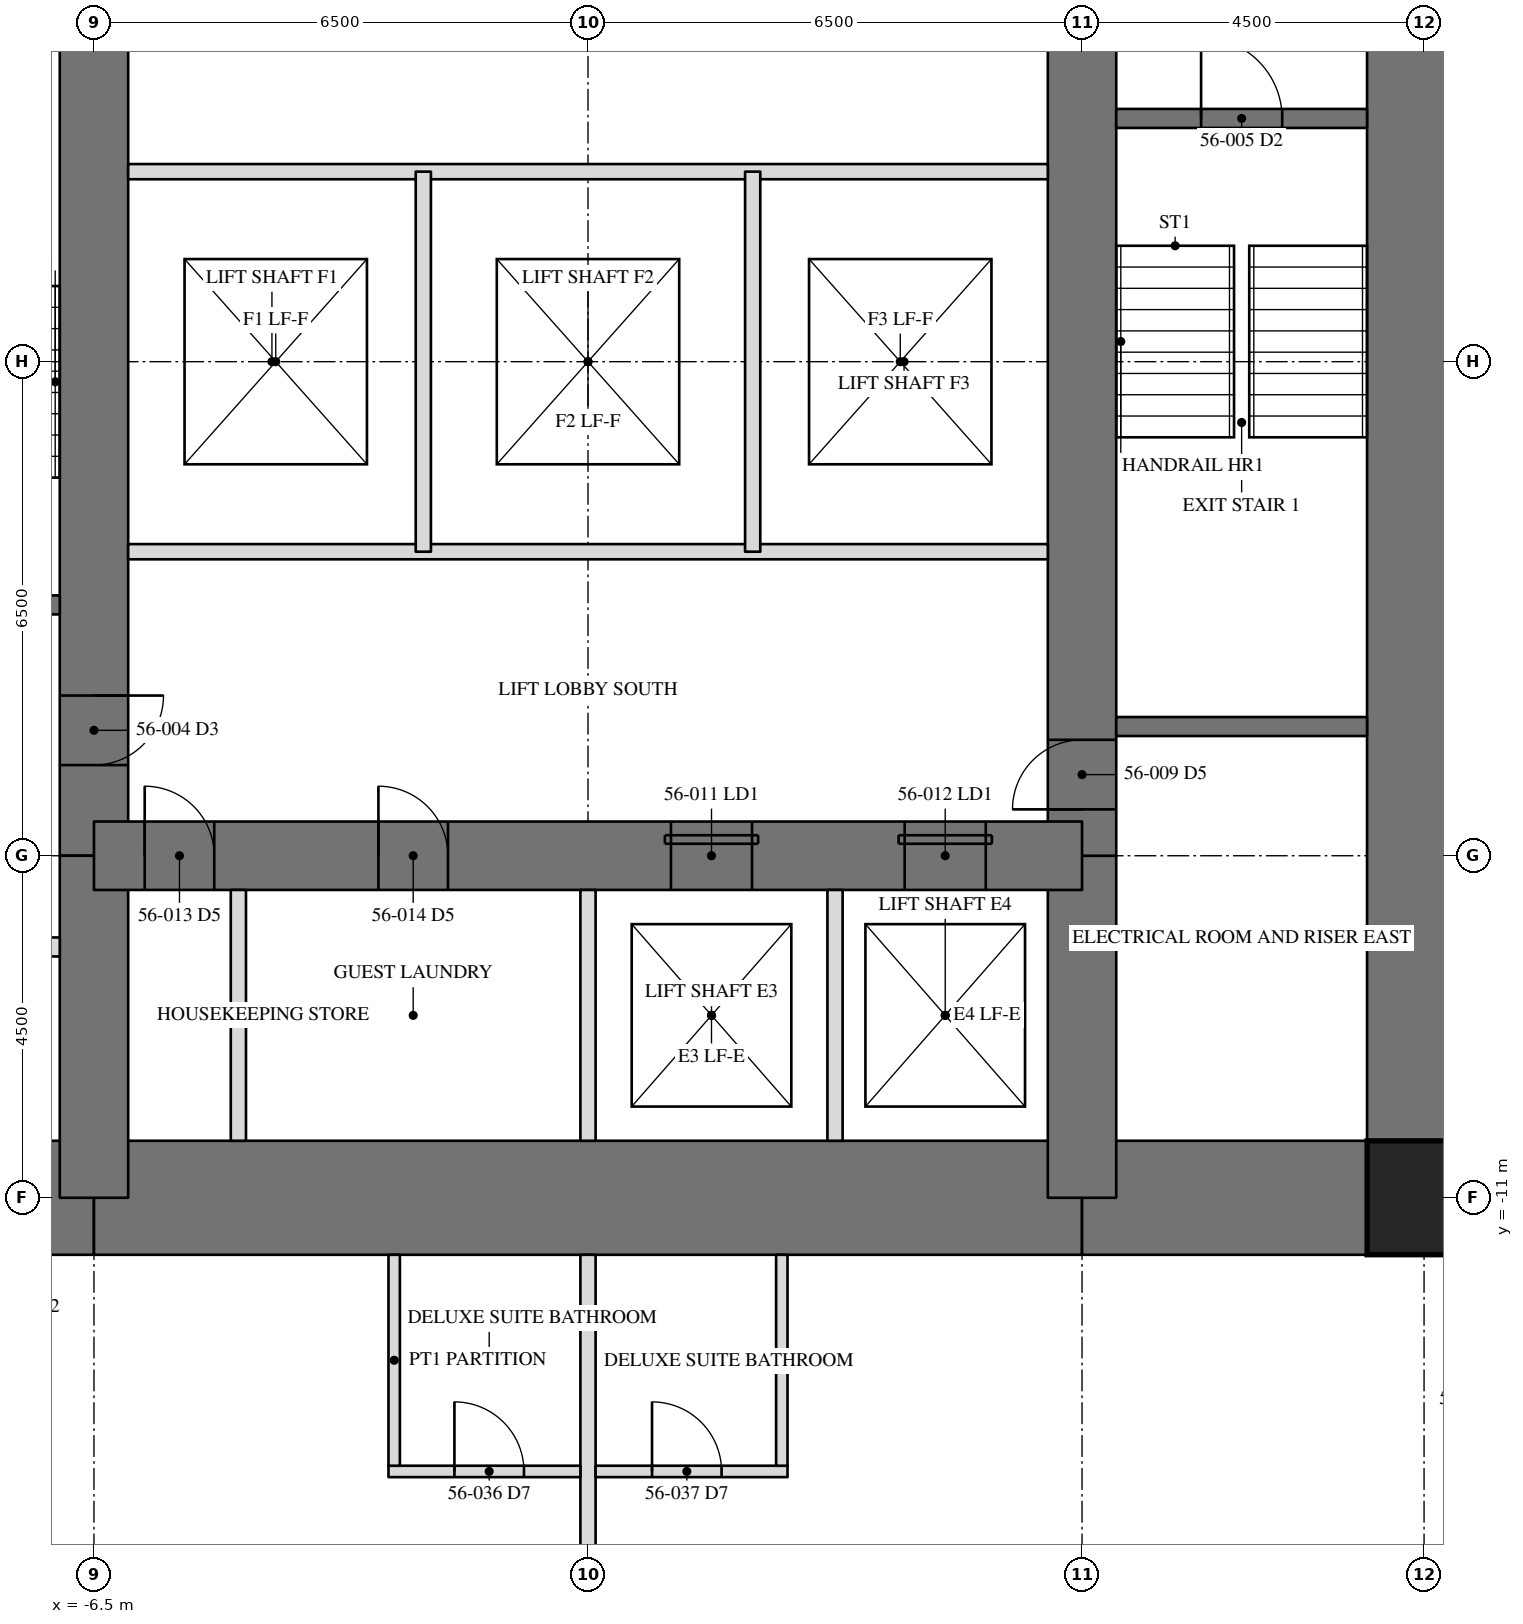
"""IFC4 building model, lengths in metres.
Left out: names, types, materials, properties, quantities, classifications, styles, units other than length and angle.
Written with IfcOpenShell. Run it as: python <this file> out.ifc"""

import sys

from ifc_helpers import new_model, si_unit, direction, frame, frame_2d, origin, origin_2d, place, context, subcontext, project, spatial, rectangle, hollow_rectangle, extrude, element, fill, save


model = new_model("IFC4")
c1 = context("Model", 3, precision=1e-05, world=origin(), true_north=direction((0.0, 1.0)))
c2 = subcontext(c1, "Body", "Model", "MODEL_VIEW")
j1 = project(units=[si_unit("LENGTHUNIT", "METRE"), si_unit("PLANEANGLEUNIT", "RADIAN")], contexts=[c1])
p1 = place(None, origin())
s1 = spatial("IfcSite", under=j1, at=p1, CompositionType="ELEMENT")
p2 = place(p1, origin())
s2 = spatial("IfcBuilding", under=s1, at=p2, CompositionType="ELEMENT")
p3 = place(p2, frame((0.0, 0.0, 232.7)))
s3 = spatial("IfcBuildingStorey", under=s2, at=p3, CompositionType="ELEMENT", Elevation=232.7)
p4 = place(p3, frame((11.0, -11.0, 0.0), z_axis=(0.0, 0.0, 1.0), x_axis=(0.0, 1.0, 0.0)))
e1 = element("IfcWall", 1, at=p4, inside=s3, PredefinedType="SHEAR", context=c2, shape_type="SweptSolid", body=[
    extrude(rectangle(XDim=22.0, YDim=1.5, at=frame_2d((11.0, 0.0))), origin(), (0.0, 0.0, 1.0), 3.5),
])
p5 = place(p4, frame((15.393, 0.0, 0.0)))
e2 = element("IfcOpeningElement", 2, at=p5, cuts=e1, PredefinedType="OPENING", context=c2, shape_type="SweptSolid", body=[
    extrude(rectangle(XDim=0.915, YDim=2.134, at=frame_2d((0.458, 1.067))), frame((0.0, 0.76, 0.0), z_axis=(0.0, -1.0, 0.0), x_axis=(1.0, 0.0, 0.0)), (0.0, 0.0, 1.0), 1.52),
])
p6 = place(p3, frame((-11.0, -11.0, 0.0), z_axis=(0.0, 0.0, 1.0), x_axis=(1.0, 0.0, 0.0)))
e3 = element("IfcWall", 3, at=p6, inside=s3, PredefinedType="SHEAR", context=c2, shape_type="SweptSolid", body=[
    extrude(rectangle(XDim=4.5, YDim=1.5, at=frame_2d((2.25, 0.0))), origin(), (0.0, 0.0, 1.0), 3.5),
])
p7 = place(p3, frame((-6.5, -11.0, 0.0), z_axis=(0.0, 0.0, 1.0), x_axis=(1.0, 0.0, 0.0)))
e4 = element("IfcWall", 4, at=p7, inside=s3, PredefinedType="SHEAR", context=c2, shape_type="SweptSolid", body=[
    extrude(rectangle(XDim=13.0, YDim=1.5, at=frame_2d((6.5, 0.0))), origin(), (0.0, 0.0, 1.0), 3.5),
])
p8 = place(p3, frame((6.5, -11.0, 0.0), z_axis=(0.0, 0.0, 1.0), x_axis=(1.0, 0.0, 0.0)))
e5 = element("IfcWall", 5, at=p8, inside=s3, PredefinedType="SHEAR", context=c2, shape_type="SweptSolid", body=[
    extrude(rectangle(XDim=4.5, YDim=1.5, at=frame_2d((2.25, 0.0))), origin(), (0.0, 0.0, 1.0), 3.5),
])
p9 = place(p3, frame((6.5, -11.0, 0.0), z_axis=(0.0, 0.0, 1.0), x_axis=(0.0, 1.0, 0.0)))
e6 = element("IfcWall", 6, at=p9, inside=s3, PredefinedType="SHEAR", context=c2, shape_type="SweptSolid", body=[
    extrude(rectangle(XDim=4.5, YDim=0.9, at=frame_2d((2.25, 0.0))), origin(), (0.0, 0.0, 1.0), 3.5),
])
p10 = place(p3, frame((6.5, -6.5, 0.0), z_axis=(0.0, 0.0, 1.0), x_axis=(0.0, 1.0, 0.0)))
e7 = element("IfcWall", 7, at=p10, inside=s3, PredefinedType="SHEAR", context=c2, shape_type="SweptSolid", body=[
    extrude(rectangle(XDim=13.0, YDim=0.9, at=frame_2d((6.5, 0.0))), origin(), (0.0, 0.0, 1.0), 3.5),
])
p11 = place(p10, frame((10.893, 0.0, 0.0)))
e8 = element("IfcOpeningElement", 8, at=p11, cuts=e7, PredefinedType="OPENING", context=c2, shape_type="SweptSolid", body=[
    extrude(rectangle(XDim=0.915, YDim=2.134, at=frame_2d((0.458, 1.067))), frame((0.0, 0.46, 0.0), z_axis=(0.0, -1.0, 0.0), x_axis=(1.0, 0.0, 0.0)), (0.0, 0.0, 1.0), 0.92),
])
p12 = place(p10, frame((0.61, 0.0, 0.0)))
e9 = element("IfcOpeningElement", 9, at=p12, cuts=e7, PredefinedType="OPENING", context=c2, shape_type="SweptSolid", body=[
    extrude(rectangle(XDim=0.915, YDim=2.134, at=frame_2d((0.458, 1.067))), frame((0.0, 0.46, 0.0), z_axis=(0.0, -1.0, 0.0), x_axis=(1.0, 0.0, 0.0)), (0.0, 0.0, 1.0), 0.92),
])
p13 = place(p3, frame((-6.5, 6.5, 0.0), z_axis=(0.0, 0.0, 1.0), x_axis=(0.0, -1.0, 0.0)))
e10 = element("IfcWall", 10, at=p13, inside=s3, PredefinedType="SHEAR", context=c2, shape_type="SweptSolid", body=[
    extrude(rectangle(XDim=13.0, YDim=0.9, at=frame_2d((6.5, 0.0))), origin(), (0.0, 0.0, 1.0), 3.5),
])
p14 = place(p13, frame((10.893, 0.0, 0.0)))
e11 = element("IfcOpeningElement", 11, at=p14, cuts=e10, PredefinedType="OPENING", context=c2, shape_type="SweptSolid", body=[
    extrude(rectangle(XDim=0.915, YDim=2.134, at=frame_2d((0.458, 1.067))), frame((0.0, 0.46, 0.0), z_axis=(0.0, -1.0, 0.0), x_axis=(1.0, 0.0, 0.0)), (0.0, 0.0, 1.0), 0.92),
])
p15 = place(p13, frame((0.61, 0.0, 0.0)))
e12 = element("IfcOpeningElement", 12, at=p15, cuts=e10, PredefinedType="OPENING", context=c2, shape_type="SweptSolid", body=[
    extrude(rectangle(XDim=0.915, YDim=2.134, at=frame_2d((0.458, 1.067))), frame((0.0, 0.46, 0.0), z_axis=(0.0, -1.0, 0.0), x_axis=(1.0, 0.0, 0.0)), (0.0, 0.0, 1.0), 0.92),
])
p16 = place(p3, frame((-6.5, -6.5, 0.0), z_axis=(0.0, 0.0, 1.0), x_axis=(0.0, -1.0, 0.0)))
e13 = element("IfcWall", 13, at=p16, inside=s3, PredefinedType="SHEAR", context=c2, shape_type="SweptSolid", body=[
    extrude(rectangle(XDim=4.5, YDim=0.9, at=frame_2d((2.25, 0.0))), origin(), (0.0, 0.0, 1.0), 3.5),
])
p17 = place(p3, frame((-6.5, -6.5, 0.0), z_axis=(0.0, 0.0, 1.0), x_axis=(1.0, 0.0, 0.0)))
e14 = element("IfcWall", 14, at=p17, inside=s3, PredefinedType="SHEAR", context=c2, shape_type="SweptSolid", body=[
    extrude(rectangle(XDim=13.0, YDim=0.9, at=frame_2d((6.5, 0.0))), origin(), (0.0, 0.0, 1.0), 3.5),
])
p18 = place(p17, frame((7.592, 0.0, 0.0)))
e15 = element("IfcOpeningElement", 15, at=p18, cuts=e14, PredefinedType="OPENING", context=c2, shape_type="SweptSolid", body=[
    extrude(rectangle(XDim=1.067, YDim=2.134, at=frame_2d((0.533, 1.067))), frame((0.0, 0.46, 0.0), z_axis=(0.0, -1.0, 0.0), x_axis=(1.0, 0.0, 0.0)), (0.0, 0.0, 1.0), 0.92),
])
p19 = place(p17, frame((10.667, 0.0, 0.0)))
e16 = element("IfcOpeningElement", 16, at=p19, cuts=e14, PredefinedType="OPENING", context=c2, shape_type="SweptSolid", body=[
    extrude(rectangle(XDim=1.067, YDim=2.134, at=frame_2d((0.533, 1.067))), frame((0.0, 0.46, 0.0), z_axis=(0.0, -1.0, 0.0), x_axis=(1.0, 0.0, 0.0)), (0.0, 0.0, 1.0), 0.92),
])
p20 = place(p17, frame((0.667, 0.0, 0.0)))
e17 = element("IfcOpeningElement", 17, at=p20, cuts=e14, PredefinedType="OPENING", context=c2, shape_type="SweptSolid", body=[
    extrude(rectangle(XDim=0.915, YDim=2.134, at=frame_2d((0.458, 1.067))), frame((0.0, 0.46, 0.0), z_axis=(0.0, -1.0, 0.0), x_axis=(1.0, 0.0, 0.0)), (0.0, 0.0, 1.0), 0.92),
])
p21 = place(p17, frame((3.742, 0.0, 0.0)))
e18 = element("IfcOpeningElement", 18, at=p21, cuts=e14, PredefinedType="OPENING", context=c2, shape_type="SweptSolid", body=[
    extrude(rectangle(XDim=0.915, YDim=2.134, at=frame_2d((0.458, 1.067))), frame((0.0, 0.46, 0.0), z_axis=(0.0, -1.0, 0.0), x_axis=(1.0, 0.0, 0.0)), (0.0, 0.0, 1.0), 0.92),
])
p22 = place(p3, frame((11.0, -11.0, 0.0), z_axis=(0.0, 0.0, 1.0), x_axis=(1.0, 0.0, 0.0)))
e19 = element("IfcColumn", 19, at=p22, inside=s3, PredefinedType="COLUMN", context=c2, shape_type="SweptSolid", body=[
    extrude(hollow_rectangle(XDim=1.499, YDim=1.499, WallThickness=0.102, at=origin_2d()), origin(), (0.0, 0.0, 1.0), 3.5),
])
p23 = place(p3, frame((6.95, -4.8, 0.0), z_axis=(0.0, 0.0, 1.0), x_axis=(1.0, 0.0, 0.0)))
e20 = element("IfcWall", 20, at=p23, inside=s3, PredefinedType="SOLIDWALL", context=c2, shape_type="SweptSolid", body=[
    extrude(rectangle(XDim=3.3, YDim=0.25, at=frame_2d((1.65, 0.0))), origin(), (0.0, 0.0, 1.0), 3.31),
])
p24 = place(p3, frame((6.95, 3.2, 0.0), z_axis=(0.0, 0.0, 1.0), x_axis=(1.0, 0.0, 0.0)))
e21 = element("IfcWall", 21, at=p24, inside=s3, PredefinedType="SOLIDWALL", context=c2, shape_type="SweptSolid", body=[
    extrude(rectangle(XDim=3.3, YDim=0.25, at=frame_2d((1.65, 0.0))), origin(), (0.0, 0.0, 1.0), 3.31),
])
p25 = place(p24, frame((1.116, 0.0, 0.0)))
e22 = element("IfcOpeningElement", 22, at=p25, cuts=e21, PredefinedType="OPENING", context=c2, shape_type="SweptSolid", body=[
    extrude(rectangle(XDim=1.067, YDim=2.134, at=frame_2d((0.533, 1.067))), frame((0.0, 0.135, 0.0), z_axis=(0.0, -1.0, 0.0), x_axis=(1.0, 0.0, 0.0)), (0.0, 0.0, 1.0), 0.27),
])
p26 = place(p3, frame((-6.95, -3.2, 0.0), z_axis=(0.0, 0.0, 1.0), x_axis=(-1.0, 0.0, 0.0)))
e23 = element("IfcWall", 23, at=p26, inside=s3, PredefinedType="SOLIDWALL", context=c2, shape_type="SweptSolid", body=[
    extrude(rectangle(XDim=3.3, YDim=0.25, at=frame_2d((1.65, 0.0))), origin(), (0.0, 0.0, 1.0), 3.31),
])
p27 = place(p26, frame((1.116, 0.0, 0.0)))
e24 = element("IfcOpeningElement", 24, at=p27, cuts=e23, PredefinedType="OPENING", context=c2, shape_type="SweptSolid", body=[
    extrude(rectangle(XDim=1.067, YDim=2.134, at=frame_2d((0.533, 1.067))), frame((0.0, 0.135, 0.0), z_axis=(0.0, -1.0, 0.0), x_axis=(1.0, 0.0, 0.0)), (0.0, 0.0, 1.0), 0.27),
])
p28 = place(p3, frame((-6.95, -7.7, 0.0), z_axis=(0.0, 0.0, 1.0), x_axis=(-1.0, 0.0, 0.0)))
e25 = element("IfcWall", 25, at=p28, inside=s3, PredefinedType="PARTITIONING", context=c2, shape_type="SweptSolid", body=[
    extrude(rectangle(XDim=3.3, YDim=0.25, at=frame_2d((1.65, 0.0))), origin(), (0.0, 0.0, 1.0), 3.31),
])
p29 = place(p28, frame((0.45, 0.0, 0.0)))
e26 = element("IfcOpeningElement", 26, at=p29, cuts=e25, PredefinedType="OPENING", context=c2, shape_type="SweptSolid", body=[
    extrude(rectangle(XDim=1.219, YDim=2.134, at=frame_2d((0.609, 1.067))), frame((0.0, 0.135, 0.0), z_axis=(0.0, -1.0, 0.0), x_axis=(1.0, 0.0, 0.0)), (0.0, 0.0, 1.0), 0.27),
])
for number, where, z_axis, x_axis in (
    (27, (-6.05, 2.5, 0.0), (0.0, 0.0, 1.0), (1.0, 0.0, 0.0)),
    (28, (6.05, -2.5, 0.0), (0.0, 0.0, 1.0), (-1.0, 0.0, 0.0)),
):
    element("IfcWall", number, at=place(p3, frame(where, z_axis=z_axis, x_axis=x_axis)), inside=s3, PredefinedType="PARTITIONING", context=c2, shape_type="SweptSolid", body=[
        extrude(rectangle(XDim=12.1, YDim=0.2, at=frame_2d((6.05, 0.0))), origin(), (0.0, 0.0, 1.0), 3.31),
    ])
for number, where, z_axis, x_axis in (
    (29, (0.0, -10.25, 0.0), (0.0, 0.0, 1.0), (0.0, 1.0, 0.0)),
    (30, (3.25, -10.25, 0.0), (0.0, 0.0, 1.0), (0.0, 1.0, 0.0)),
):
    element("IfcWall", number, at=place(p3, frame(where, z_axis=z_axis, x_axis=x_axis)), inside=s3, PredefinedType="PARTITIONING", context=c2, shape_type="SweptSolid", body=[
        extrude(rectangle(XDim=3.3, YDim=0.2, at=frame_2d((1.65, 0.0))), origin(), (0.0, 0.0, 1.0), 3.31),
    ])
for number, where, z_axis, x_axis in (
    (31, (-2.167, -2.5, 0.0), (0.0, 0.0, 1.0), (0.0, 1.0, 0.0)),
    (32, (2.167, -2.5, 0.0), (0.0, 0.0, 1.0), (0.0, 1.0, 0.0)),
):
    element("IfcWall", number, at=place(p3, frame(where, z_axis=z_axis, x_axis=x_axis)), inside=s3, PredefinedType="PARTITIONING", context=c2, shape_type="SweptSolid", body=[
        extrude(rectangle(XDim=5.0, YDim=0.2, at=frame_2d((2.5, 0.0))), origin(), (0.0, 0.0, 1.0), 3.31),
    ])
p30 = place(p3, frame((-4.6, -10.25, 0.0), z_axis=(0.0, 0.0, 1.0), x_axis=(0.0, 1.0, 0.0)))
e33 = element("IfcWall", 33, at=p30, inside=s3, PredefinedType="PARTITIONING", context=c2, shape_type="SweptSolid", body=[
    extrude(rectangle(XDim=3.3, YDim=0.2, at=frame_2d((1.65, 0.0))), origin(), (0.0, 0.0, 1.0), 3.31),
])
p31 = place(p3, frame((0.0, -11.75, 0.0), z_axis=(0.0, 0.0, 1.0), x_axis=(0.0, -1.0, 0.0)))
e34 = element("IfcWall", 34, at=p31, inside=s3, PredefinedType="PARTITIONING", context=c2, shape_type="SweptSolid", body=[
    extrude(rectangle(XDim=8.165, YDim=0.2, at=frame_2d((4.083, 0.0))), origin(), (0.0, 0.0, 1.0), 2.802),
])
p32 = place(p3, frame((-2.625, -14.6, 0.0), z_axis=(0.0, 0.0, 1.0), x_axis=(1.0, 0.0, 0.0)))
e35 = element("IfcWall", 35, at=p32, inside=s3, PredefinedType="PARTITIONING", context=c2, shape_type="SweptSolid", body=[
    extrude(rectangle(XDim=2.525, YDim=0.15, at=frame_2d((1.262, 0.0))), origin(), (0.0, 0.0, 1.0), 3.31),
])
p33 = place(p32, frame((0.867, 0.0, 0.0)))
e36 = element("IfcOpeningElement", 36, at=p33, cuts=e35, PredefinedType="OPENING", context=c2, shape_type="SweptSolid", body=[
    extrude(rectangle(XDim=0.915, YDim=2.032, at=frame_2d((0.458, 1.016))), frame((0.0, 0.085, 0.0), z_axis=(0.0, -1.0, 0.0), x_axis=(1.0, 0.0, 0.0)), (0.0, 0.0, 1.0), 0.17),
])
p34 = place(p3, frame((-2.55, -11.75, 0.0), z_axis=(0.0, 0.0, 1.0), x_axis=(0.0, -1.0, 0.0)))
e37 = element("IfcWall", 37, at=p34, inside=s3, PredefinedType="PARTITIONING", context=c2, shape_type="SweptSolid", body=[
    extrude(rectangle(XDim=2.775, YDim=0.15, at=frame_2d((1.387, 0.0))), origin(), (0.0, 0.0, 1.0), 3.31),
])
p35 = place(p3, frame((0.1, -14.6, 0.0), z_axis=(0.0, 0.0, 1.0), x_axis=(1.0, 0.0, 0.0)))
e38 = element("IfcWall", 38, at=p35, inside=s3, PredefinedType="PARTITIONING", context=c2, shape_type="SweptSolid", body=[
    extrude(rectangle(XDim=2.525, YDim=0.15, at=frame_2d((1.262, 0.0))), origin(), (0.0, 0.0, 1.0), 3.31),
])
p36 = place(p35, frame((0.742, 0.0, 0.0)))
e39 = element("IfcOpeningElement", 39, at=p36, cuts=e38, PredefinedType="OPENING", context=c2, shape_type="SweptSolid", body=[
    extrude(rectangle(XDim=0.915, YDim=2.032, at=frame_2d((0.458, 1.016))), frame((0.0, 0.085, 0.0), z_axis=(0.0, -1.0, 0.0), x_axis=(1.0, 0.0, 0.0)), (0.0, 0.0, 1.0), 0.17),
])
p37 = place(p3, frame((2.55, -11.75, 0.0), z_axis=(0.0, 0.0, 1.0), x_axis=(0.0, -1.0, 0.0)))
e40 = element("IfcWall", 40, at=p37, inside=s3, PredefinedType="PARTITIONING", context=c2, shape_type="SweptSolid", body=[
    extrude(rectangle(XDim=2.775, YDim=0.15, at=frame_2d((1.387, 0.0))), origin(), (0.0, 0.0, 1.0), 3.31),
])
p38 = place(p14, origin())
e41 = element("IfcDoor", 41, at=p38, inside=s3, OperationType="SINGLE_SWING_RIGHT", PredefinedType="DOOR", context=c2, shape_type="SweptSolid", body=[
    extrude(rectangle(XDim=0.915, YDim=2.134, at=frame_2d((0.458, 1.067))), frame((0.0, -0.375, 0.0), z_axis=(0.0, -1.0, 0.0), x_axis=(1.0, 0.0, 0.0)), (0.0, 0.0, 1.0), 0.05),
])
fill(e11, e41)
p39 = place(p25, origin())
e42 = element("IfcDoor", 42, at=p39, inside=s3, OperationType="SINGLE_SWING_LEFT", PredefinedType="DOOR", context=c2, shape_type="SweptSolid", body=[
    extrude(rectangle(XDim=1.067, YDim=2.134, at=frame_2d((0.533, 1.067))), frame((0.0, 0.025, 0.0), z_axis=(0.0, -1.0, 0.0), x_axis=(1.0, 0.0, 0.0)), (0.0, 0.0, 1.0), 0.05),
])
fill(e22, e42)
p40 = place(p12, origin())
e43 = element("IfcDoor", 43, at=p40, inside=s3, OperationType="SINGLE_SWING_RIGHT", PredefinedType="DOOR", context=c2, shape_type="SweptSolid", body=[
    extrude(rectangle(XDim=0.915, YDim=2.134, at=frame_2d((0.458, 1.067))), frame((0.0, -0.375, 0.0), z_axis=(0.0, -1.0, 0.0), x_axis=(1.0, 0.0, 0.0)), (0.0, 0.0, 1.0), 0.05),
])
fill(e9, e43)
p41 = place(p18, origin())
e44 = element("IfcDoor", 44, at=p41, inside=s3, OperationType="SLIDING_TO_LEFT", PredefinedType="DOOR", context=c2, shape_type="SweptSolid", body=[
    extrude(rectangle(XDim=1.067, YDim=2.134, at=frame_2d((0.533, 1.067))), frame((0.0, -0.375, 0.0), z_axis=(0.0, -1.0, 0.0), x_axis=(1.0, 0.0, 0.0)), (0.0, 0.0, 1.0), 0.05),
])
fill(e15, e44)
p42 = place(p19, origin())
e45 = element("IfcDoor", 45, at=p42, inside=s3, OperationType="SLIDING_TO_LEFT", PredefinedType="DOOR", context=c2, shape_type="SweptSolid", body=[
    extrude(rectangle(XDim=1.067, YDim=2.134, at=frame_2d((0.533, 1.067))), frame((0.0, -0.375, 0.0), z_axis=(0.0, -1.0, 0.0), x_axis=(1.0, 0.0, 0.0)), (0.0, 0.0, 1.0), 0.05),
])
fill(e16, e45)
p43 = place(p20, origin())
e46 = element("IfcDoor", 46, at=p43, inside=s3, OperationType="SINGLE_SWING_RIGHT", PredefinedType="DOOR", context=c2, shape_type="SweptSolid", body=[
    extrude(rectangle(XDim=0.915, YDim=2.134, at=frame_2d((0.458, 1.067))), frame((0.0, -0.375, 0.0), z_axis=(0.0, -1.0, 0.0), x_axis=(1.0, 0.0, 0.0)), (0.0, 0.0, 1.0), 0.05),
])
fill(e17, e46)
p44 = place(p21, origin())
e47 = element("IfcDoor", 47, at=p44, inside=s3, OperationType="SINGLE_SWING_RIGHT", PredefinedType="DOOR", context=c2, shape_type="SweptSolid", body=[
    extrude(rectangle(XDim=0.915, YDim=2.134, at=frame_2d((0.458, 1.067))), frame((0.0, -0.375, 0.0), z_axis=(0.0, -1.0, 0.0), x_axis=(1.0, 0.0, 0.0)), (0.0, 0.0, 1.0), 0.05),
])
fill(e18, e47)
p45 = place(p33, origin())
e48 = element("IfcDoor", 48, at=p45, inside=s3, OperationType="SINGLE_SWING_LEFT", PredefinedType="DOOR", context=c2, shape_type="SweptSolid", body=[
    extrude(rectangle(XDim=0.915, YDim=2.032, at=frame_2d((0.458, 1.016))), frame((0.0, 0.025, 0.0), z_axis=(0.0, -1.0, 0.0), x_axis=(1.0, 0.0, 0.0)), (0.0, 0.0, 1.0), 0.05),
])
fill(e36, e48)
p46 = place(p36, origin())
e49 = element("IfcDoor", 49, at=p46, inside=s3, OperationType="SINGLE_SWING_LEFT", PredefinedType="DOOR", context=c2, shape_type="SweptSolid", body=[
    extrude(rectangle(XDim=0.915, YDim=2.032, at=frame_2d((0.458, 1.016))), frame((0.0, 0.025, 0.0), z_axis=(0.0, -1.0, 0.0), x_axis=(1.0, 0.0, 0.0)), (0.0, 0.0, 1.0), 0.05),
])
fill(e39, e49)
save(model, sys.argv[1])
